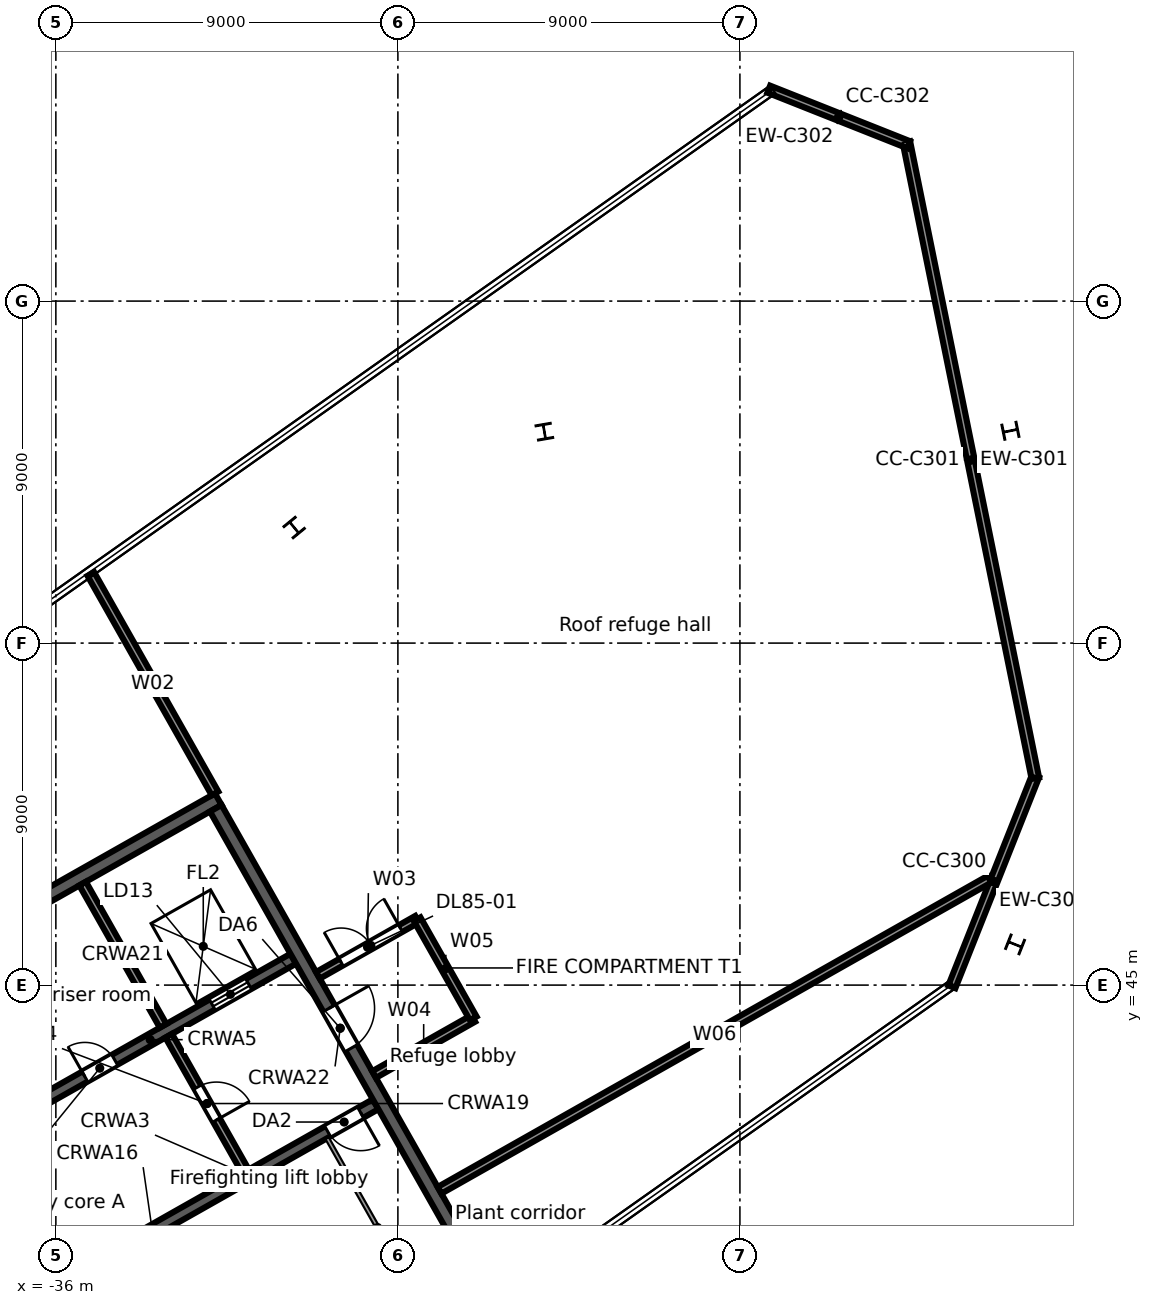
"""IFC4 building model, lengths in metres.
Left out: names, types, materials, properties, quantities, classifications, styles, units other than length and angle.
Written with IfcOpenShell. Run it as: python <this file> out.ifc"""

import sys

from ifc_helpers import new_model, si_unit, direction, frame, frame_2d, origin, origin_2d, place, context, subcontext, project, spatial, rectangle, i_section, extrude, element, fill, save


model = new_model("IFC4")
c1 = context("Model", 3, precision=1e-05, world=origin(), true_north=direction((0.0, 1.0)))
c2 = subcontext(c1, "Body", "Model", "MODEL_VIEW")
j1 = project(units=[si_unit("LENGTHUNIT", "METRE"), si_unit("PLANEANGLEUNIT", "RADIAN")], contexts=[c1])
p1 = place(None, origin())
s1 = spatial("IfcSite", under=j1, at=p1, CompositionType="ELEMENT")
p2 = place(p1, origin())
s2 = spatial("IfcBuilding", under=s1, at=p2, CompositionType="ELEMENT")
p3 = place(p2, frame((0.0, 0.0, 368.5)))
s3 = spatial("IfcBuildingStorey", under=s2, at=p3, CompositionType="ELEMENT", Elevation=368.5)
for number, where, z_axis, x_axis in (
    (1, (-10.76, 46.071, 0.0), (0.0, 0.0, 1.0), (0.369, 0.929, 0.0)),
    (2, (-10.882, 59.587, 0.0), (0.0, 0.0, 1.0), (-0.199, 0.98, 0.0)),
    (3, (-23.146, 59.563, 0.0), (0.0, 0.0, 1.0), (0.985, 0.171, 0.0)),
    (4, (-29.729, 57.042, 0.0), (0.0, 0.0, 1.0), (-0.773, -0.635, 0.0)),
):
    element("IfcColumn", number, at=place(p3, frame(where, z_axis=z_axis, x_axis=x_axis)), inside=s3, PredefinedType="COLUMN", context=c2, shape_type="SweptSolid", body=[
        extrude(i_section(OverallWidth=0.4, OverallDepth=0.4, WebThickness=0.013, FlangeThickness=0.021, FilletRadius=0.022, at=origin_2d()), origin(), (0.0, 0.0, 1.0), 3.3),
    ])
p4 = place(p3, frame((-10.22, 50.501, 0.0), z_axis=(0.0, 0.0, 1.0), x_axis=(-0.369026712049, -0.929418789241, 0.0)))
e5 = element("IfcWall", 5, at=p4, inside=s3, PredefinedType="STANDARD", context=c2, shape_type="SweptSolid", body=[
    extrude(rectangle(XDim=5.968, YDim=0.2, at=frame_2d((2.984, 0.0))), origin(), (0.0, 0.0, 1.0), 2.85),
])
p5 = place(p3, frame((-13.62, 67.188, 0.0), z_axis=(0.0, 0.0, 1.0), x_axis=(0.198668549131, -0.980066736292, 0.0)))
e6 = element("IfcWall", 6, at=p5, inside=s3, PredefinedType="STANDARD", context=c2, shape_type="SweptSolid", body=[
    extrude(rectangle(XDim=17.084, YDim=0.2, at=frame_2d((8.542, 0.0))), origin(), (0.0, 0.0, 1.0), 2.85),
])
p6 = place(p3, frame((-17.241, 68.577, 0.0), z_axis=(0.0, 0.0, 1.0), x_axis=(0.929408544005, -0.369052514325, 0.0)))
e7 = element("IfcWall", 7, at=p6, inside=s3, PredefinedType="STANDARD", context=c2, shape_type="SweptSolid", body=[
    extrude(rectangle(XDim=3.963, YDim=0.2, at=frame_2d((1.981, 0.0))), origin(), (0.0, 0.0, 1.0), 3.6),
])
p7 = place(p3, frame((-34.245, 38.097, 0.0), z_axis=(0.0, 0.0, 1.0), x_axis=(0.870352347706, 0.49242947804, 0.0)))
e8 = element("IfcWall", 8, at=p7, inside=s3, PredefinedType="SOLIDWALL", context=c2, shape_type="SweptSolid", body=[
    extrude(rectangle(XDim=7.65, YDim=0.3, at=frame_2d((3.825, 0.0))), origin(), (0.0, 0.0, 1.0), 3.3),
])
p8 = place(p7, frame((6.2, 0.0, 0.0)))
e9 = element("IfcOpeningElement", 9, at=p8, cuts=e8, PredefinedType="OPENING", context=c2, shape_type="SweptSolid", body=[
    extrude(rectangle(XDim=1.0, YDim=2.1, at=frame_2d((0.5, 1.05))), frame((0.0, 0.16, 0.0), z_axis=(0.0, -1.0, 0.0), x_axis=(1.0, 0.0, 0.0)), (0.0, 0.0, 1.0), 0.32),
])
p9 = place(p3, frame((-37.282, 41.435, 0.0), z_axis=(0.0, 0.0, 1.0), x_axis=(0.870364588774, 0.492407841741, 0.0)))
e10 = element("IfcWall", 10, at=p9, inside=s3, PredefinedType="SOLIDWALL", context=c2, shape_type="SweptSolid", body=[
    extrude(rectangle(XDim=8.65, YDim=0.3, at=frame_2d((4.325, 0.0))), origin(), (0.0, 0.0, 1.0), 3.3),
])
p10 = place(p9, frame((6.2, 0.0, 0.0)))
e11 = element("IfcOpeningElement", 11, at=p10, cuts=e10, PredefinedType="OPENING", context=c2, shape_type="SweptSolid", body=[
    extrude(rectangle(XDim=1.1, YDim=2.1, at=frame_2d((0.55, 1.05))), frame((0.0, 0.16, 0.0), z_axis=(0.0, -1.0, 0.0), x_axis=(1.0, 0.0, 0.0)), (0.0, 0.0, 1.0), 0.32),
])
p11 = place(p9, frame((2.35, 0.0, 0.0)))
e12 = element("IfcOpeningElement", 12, at=p11, cuts=e10, PredefinedType="OPENING", context=c2, shape_type="SweptSolid", body=[
    extrude(rectangle(XDim=0.9, YDim=2.1, at=frame_2d((0.45, 1.05))), frame((0.0, 0.16, 0.0), z_axis=(0.0, -1.0, 0.0), x_axis=(1.0, 0.0, 0.0)), (0.0, 0.0, 1.0), 0.32),
])
p12 = place(p3, frame((-46.522, 41.521, 0.0), z_axis=(0.0, 0.0, 1.0), x_axis=(0.870359753402, 0.492416388494, 0.0)))
e13 = element("IfcWall", 13, at=p12, inside=s3, PredefinedType="SOLIDWALL", context=c2, shape_type="SweptSolid", body=[
    extrude(rectangle(XDim=17.0, YDim=0.35, at=frame_2d((8.5, 0.0))), origin(), (0.0, 0.0, 1.0), 3.3),
])
p13 = place(p3, frame((-33.031, 43.667, 0.0), z_axis=(0.0, 0.0, 1.0), x_axis=(0.492408451753, -0.87036424366, 0.0)))
e14 = element("IfcWall", 14, at=p13, inside=s3, PredefinedType="PARTITIONING", context=c2, shape_type="SweptSolid", body=[
    extrude(rectangle(XDim=4.1, YDim=0.2, at=frame_2d((2.05, 0.0))), origin(), (0.0, 0.0, 1.0), 3.3),
])
p14 = place(p13, frame((1.55, 0.0, 0.0)))
e15 = element("IfcOpeningElement", 15, at=p14, cuts=e14, PredefinedType="OPENING", context=c2, shape_type="SweptSolid", body=[
    extrude(rectangle(XDim=1.0, YDim=2.1, at=frame_2d((0.5, 1.05))), frame((0.0, 0.11, 0.0), z_axis=(0.0, -1.0, 0.0), x_axis=(1.0, 0.0, 0.0)), (0.0, 0.0, 1.0), 0.22),
])
p15 = place(p3, frame((-35.296, 47.671, 0.0), z_axis=(0.0, 0.0, 1.0), x_axis=(0.492435133428, -0.870349147967, 0.0)))
e16 = element("IfcWall", 16, at=p15, inside=s3, PredefinedType="SOLIDWALL", context=c2, shape_type="SweptSolid", body=[
    extrude(rectangle(XDim=4.3, YDim=0.2, at=frame_2d((2.15, 0.0))), origin(), (0.0, 0.0, 1.0), 3.3),
])
p16 = place(p3, frame((-31.792, 49.653, 0.0), z_axis=(0.0, 0.0, 1.0), x_axis=(0.492421943245, -0.870356610712, 0.0)))
e17 = element("IfcWall", 17, at=p16, inside=s3, PredefinedType="SOLIDWALL", context=c2, shape_type="SweptSolid", body=[
    extrude(rectangle(XDim=13.3, YDim=0.35, at=frame_2d((6.65, 0.0))), origin(), (0.0, 0.0, 1.0), 3.3),
])
p17 = place(p16, frame((6.05, 0.0, 0.0)))
e18 = element("IfcOpeningElement", 18, at=p17, cuts=e17, PredefinedType="OPENING", context=c2, shape_type="SweptSolid", body=[
    extrude(rectangle(XDim=1.2, YDim=2.1, at=frame_2d((0.6, 1.05))), frame((0.0, 0.185, 0.0), z_axis=(0.0, -1.0, 0.0), x_axis=(1.0, 0.0, 0.0)), (0.0, 0.0, 1.0), 0.37),
])
p18 = place(p3, frame((-35.08, 55.819, 0.0), z_axis=(0.0, 0.0, 1.0), x_axis=(0.49249727422, -0.870313986379, 0.0)))
e19 = element("IfcWall", 19, at=p18, inside=s3, PredefinedType="PARTITIONING", context=c2, shape_type="SweptSolid", body=[
    extrude(rectangle(XDim=6.636, YDim=0.2, at=frame_2d((3.318, 0.0))), origin(), (0.0, 0.0, 1.0), 3.3),
])
p19 = place(p3, frame((-29.104, 45.257, 0.0), z_axis=(0.0, 0.0, 1.0), x_axis=(0.870423351516, 0.492303960105, 0.0)))
e20 = element("IfcWall", 20, at=p19, inside=s3, PredefinedType="PARTITIONING", context=c2, shape_type="SweptSolid", body=[
    extrude(rectangle(XDim=3.0, YDim=0.2, at=frame_2d((1.5, 0.0))), origin(), (0.0, 0.0, 1.0), 3.3),
])
p20 = place(p19, frame((0.7, 0.0, 0.0)))
e21 = element("IfcOpeningElement", 21, at=p20, cuts=e20, PredefinedType="OPENING", context=c2, shape_type="SweptSolid", body=[
    extrude(rectangle(XDim=1.8, YDim=2.1, at=frame_2d((0.9, 1.05))), frame((0.0, 0.11, 0.0), z_axis=(0.0, -1.0, 0.0), x_axis=(1.0, 0.0, 0.0)), (0.0, 0.0, 1.0), 0.22),
])
p21 = place(p3, frame((-27.627, 42.646, 0.0), z_axis=(0.0, 0.0, 1.0), x_axis=(0.870368744559, 0.492400496034, 0.0)))
e22 = element("IfcWall", 22, at=p21, inside=s3, PredefinedType="PARTITIONING", context=c2, shape_type="SweptSolid", body=[
    extrude(rectangle(XDim=3.0, YDim=0.2, at=frame_2d((1.5, 0.0))), origin(), (0.0, 0.0, 1.0), 3.3),
])
p22 = place(p3, frame((-26.493, 46.734, 0.0), z_axis=(0.0, 0.0, 1.0), x_axis=(0.492338837132, -0.870403624448, 0.0)))
e23 = element("IfcWall", 23, at=p22, inside=s3, PredefinedType="PARTITIONING", context=c2, shape_type="SweptSolid", body=[
    extrude(rectangle(XDim=3.0, YDim=0.2, at=frame_2d((1.5, 0.0))), origin(), (0.0, 0.0, 1.0), 3.3),
])
p23 = place(p3, frame((-25.904, 39.6, 0.0), z_axis=(0.0, 0.0, 1.0), x_axis=(0.870362303086, 0.49241188183, 0.0)))
e24 = element("IfcWall", 24, at=p23, inside=s3, PredefinedType="PARTITIONING", context=c2, shape_type="SweptSolid", body=[
    extrude(rectangle(XDim=16.626, YDim=0.2, at=frame_2d((8.313, 0.0))), origin(), (0.0, 0.0, 1.0), 3.3),
])
p24 = place(p10, origin())
e25 = element("IfcDoor", 25, at=p24, inside=s3, OperationType="DOUBLE_DOOR_SLIDING", PredefinedType="DOOR", context=c2, shape_type="SweptSolid", body=[
    extrude(rectangle(XDim=1.1, YDim=2.1, at=frame_2d((0.55, 1.05))), frame((0.0, 0.025, 0.0), z_axis=(0.0, -1.0, 0.0), x_axis=(1.0, 0.0, 0.0)), (0.0, 0.0, 1.0), 0.05),
])
fill(e11, e25)
p25 = place(p8, frame((1.0, 0.0, 0.0), z_axis=(0.0, 0.0, 1.0), x_axis=(-1.0, 0.0, 0.0)))
e26 = element("IfcDoor", 26, at=p25, inside=s3, OperationType="SINGLE_SWING_LEFT", PredefinedType="DOOR", context=c2, shape_type="SweptSolid", body=[
    extrude(rectangle(XDim=1.0, YDim=2.1, at=frame_2d((0.5, 1.05))), frame((0.0, 0.025, 0.0), z_axis=(0.0, -1.0, 0.0), x_axis=(1.0, 0.0, 0.0)), (0.0, 0.0, 1.0), 0.05),
])
fill(e9, e26)
p26 = place(p14, origin())
e27 = element("IfcDoor", 27, at=p26, inside=s3, OperationType="SINGLE_SWING_RIGHT", PredefinedType="DOOR", context=c2, shape_type="SweptSolid", body=[
    extrude(rectangle(XDim=1.0, YDim=2.1, at=frame_2d((0.5, 1.05))), frame((0.0, 0.025, 0.0), z_axis=(0.0, -1.0, 0.0), x_axis=(1.0, 0.0, 0.0)), (0.0, 0.0, 1.0), 0.05),
])
fill(e15, e27)
p27 = place(p17, origin())
e28 = element("IfcDoor", 28, at=p27, inside=s3, OperationType="SINGLE_SWING_LEFT", PredefinedType="DOOR", context=c2, shape_type="SweptSolid", body=[
    extrude(rectangle(XDim=1.2, YDim=2.1, at=frame_2d((0.6, 1.05))), frame((0.0, 0.025, 0.0), z_axis=(0.0, -1.0, 0.0), x_axis=(1.0, 0.0, 0.0)), (0.0, 0.0, 1.0), 0.05),
])
fill(e18, e28)
p28 = place(p11, origin())
e29 = element("IfcDoor", 29, at=p28, inside=s3, OperationType="SINGLE_SWING_LEFT", PredefinedType="DOOR", context=c2, shape_type="SweptSolid", body=[
    extrude(rectangle(XDim=0.9, YDim=2.1, at=frame_2d((0.45, 1.05))), frame((0.0, 0.025, 0.0), z_axis=(0.0, -1.0, 0.0), x_axis=(1.0, 0.0, 0.0)), (0.0, 0.0, 1.0), 0.05),
])
fill(e12, e29)
p29 = place(p20, origin())
e30 = element("IfcDoor", 30, at=p29, inside=s3, OperationType="DOUBLE_DOOR_SINGLE_SWING", PredefinedType="DOOR", context=c2, shape_type="SweptSolid", body=[
    extrude(rectangle(XDim=1.8, YDim=2.1, at=frame_2d((0.9, 1.05))), frame((0.0, 0.025, 0.0), z_axis=(0.0, -1.0, 0.0), x_axis=(1.0, 0.0, 0.0)), (0.0, 0.0, 1.0), 0.05),
])
fill(e21, e30)
save(model, sys.argv[1])
